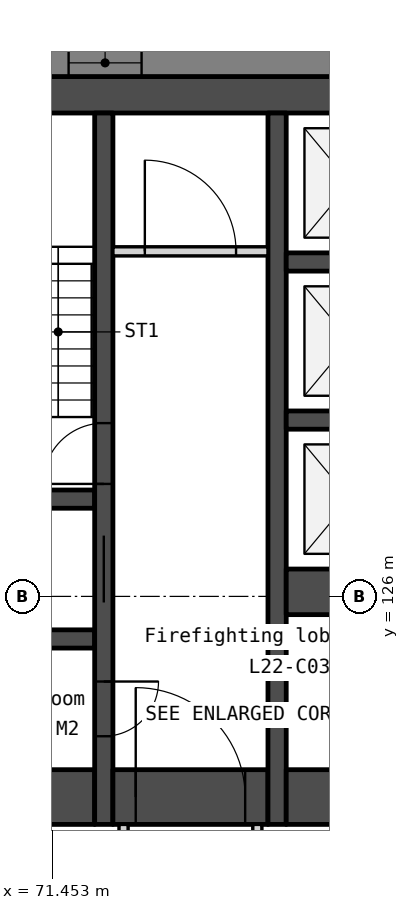
"""IFC4 building model, lengths in metres.
Left out: names, types, materials, properties, quantities, classifications, styles, units other than length and angle.
Written with IfcOpenShell. Run it as: python <this file> out.ifc"""

import sys

from ifc_helpers import new_model, si_unit, direction, frame, frame_2d, origin, place, context, subcontext, project, spatial, polyline, rectangle, outline, extrude, element, fill, save


model = new_model("IFC4")
c1 = context("Model", 3, precision=1e-05, world=origin(), true_north=direction((0.0, 1.0)))
c2 = subcontext(c1, "Body", "Model", "MODEL_VIEW")
j1 = project(units=[si_unit("LENGTHUNIT", "METRE"), si_unit("PLANEANGLEUNIT", "RADIAN")], contexts=[c1])
p1 = place(None, origin())
s1 = spatial("IfcSite", under=j1, at=p1, CompositionType="ELEMENT")
p2 = place(p1, origin())
s2 = spatial("IfcBuilding", under=s1, at=p2, CompositionType="ELEMENT")
p3 = place(p2, frame((0.0, 0.0, 92.3)))
s3 = spatial("IfcBuildingStorey", under=s2, at=p3, CompositionType="ELEMENT", Elevation=92.3)
p4 = place(p3, frame((66.0, 134.25, 0.0), z_axis=(0.0, 0.0, 1.0), x_axis=(1.0, 0.0, 0.0)))
e1 = element("IfcWall", 1, at=p4, inside=s3, PredefinedType="SOLIDWALL", context=c2, shape_type="SweptSolid", body=[
    extrude(rectangle(XDim=28.0, YDim=0.6, at=frame_2d((14.0, 0.0))), origin(), (0.0, 0.0, 1.0), 3.35),
])
for number, where, z_axis, x_axis in (
    (2, (69.6, 127.6, 0.0), (0.0, 0.0, 1.0), (1.0, 0.0, 0.0)),
    (3, (69.6, 125.3, 0.0), (0.0, 0.0, 1.0), (1.0, 0.0, 0.0)),
):
    element("IfcWall", number, at=place(p3, frame(where, z_axis=z_axis, x_axis=x_axis)), inside=s3, PredefinedType="SOLIDWALL", context=c2, shape_type="SweptSolid", body=[
        extrude(rectangle(XDim=2.55, YDim=0.3, at=frame_2d((1.275, 0.0))), origin(), (0.0, 0.0, 1.0), 3.35),
    ])
p5 = place(p3, frame((69.6, 122.7, 0.0), z_axis=(0.0, 0.0, 1.0), x_axis=(1.0, 0.0, 0.0)))
e4 = element("IfcWall", 4, at=p5, inside=s3, PredefinedType="SOLIDWALL", context=c2, shape_type="SweptSolid", body=[
    extrude(rectangle(XDim=2.55, YDim=0.9, at=frame_2d((1.275, 0.0))), origin(), (0.0, 0.0, 1.0), 3.35),
])
p6 = place(p3, frame((72.3, 133.95, 0.0), z_axis=(0.0, 0.0, 1.0), x_axis=(0.0, -1.0, 0.0)))
e5 = element("IfcWall", 5, at=p6, inside=s3, PredefinedType="SOLIDWALL", context=c2, shape_type="SweptSolid", body=[
    extrude(rectangle(XDim=11.7, YDim=0.3, at=frame_2d((5.85, 0.0))), origin(), (0.0, 0.0, 1.0), 3.35),
])
p7 = place(p6, frame((6.95, 0.0, 0.0)))
e6 = element("IfcOpeningElement", 6, at=p7, cuts=e5, PredefinedType="OPENING", context=c2, shape_type="SweptSolid", body=[
    extrude(rectangle(XDim=1.1, YDim=2.1, at=frame_2d((0.55, 1.05))), frame((0.0, 0.16, 0.0), z_axis=(0.0, -1.0, 0.0), x_axis=(1.0, 0.0, 0.0)), (0.0, 0.0, 1.0), 0.32),
])
p8 = place(p6, frame((9.35, 0.0, 0.0)))
e7 = element("IfcOpeningElement", 7, at=p8, cuts=e5, PredefinedType="OPENING", context=c2, shape_type="SweptSolid", body=[
    extrude(rectangle(XDim=0.9, YDim=2.1, at=frame_2d((0.45, 1.05))), frame((0.0, 0.16, 0.0), z_axis=(0.0, -1.0, 0.0), x_axis=(1.0, 0.0, 0.0)), (0.0, 0.0, 1.0), 0.32),
])
p9 = place(p6, frame((5.1, 0.0, 0.0)))
e8 = element("IfcOpeningElement", 8, at=p9, cuts=e5, PredefinedType="OPENING", context=c2, shape_type="SweptSolid", body=[
    extrude(rectangle(XDim=1.0, YDim=2.1, at=frame_2d((0.5, 1.05))), frame((0.0, 0.16, 0.0), z_axis=(0.0, -1.0, 0.0), x_axis=(1.0, 0.0, 0.0)), (0.0, 0.0, 1.0), 0.32),
])
p10 = place(p3, frame((72.45, 131.675, 0.0), z_axis=(0.0, 0.0, 1.0), x_axis=(1.0, 0.0, 0.0)))
e9 = element("IfcWall", 9, at=p10, inside=s3, PredefinedType="PARTITIONING", context=c2, shape_type="SweptSolid", body=[
    extrude(rectangle(XDim=2.55, YDim=0.15, at=frame_2d((1.275, 0.0))), origin(), (0.0, 0.0, 1.0), 3.35),
])
p11 = place(p10, frame((0.525, 0.0, 0.0)))
e10 = element("IfcOpeningElement", 10, at=p11, cuts=e9, PredefinedType="OPENING", context=c2, shape_type="SweptSolid", body=[
    extrude(rectangle(XDim=1.5, YDim=2.1, at=frame_2d((0.75, 1.05))), frame((0.0, 0.085, 0.0), z_axis=(0.0, -1.0, 0.0), x_axis=(1.0, 0.0, 0.0)), (0.0, 0.0, 1.0), 0.17),
])
p12 = place(p3, frame((72.45, 122.7, 0.0), z_axis=(0.0, 0.0, 1.0), x_axis=(1.0, 0.0, 0.0)))
e11 = element("IfcWall", 11, at=p12, inside=s3, PredefinedType="SOLIDWALL", context=c2, shape_type="SweptSolid", body=[
    extrude(rectangle(XDim=2.55, YDim=0.9, at=frame_2d((1.275, 0.0))), origin(), (0.0, 0.0, 1.0), 3.35),
])
p13 = place(p12, frame((0.375, 0.0, 0.0)))
e12 = element("IfcOpeningElement", 12, at=p13, cuts=e11, PredefinedType="OPENING", context=c2, shape_type="SweptSolid", body=[
    extrude(rectangle(XDim=1.8, YDim=2.1, at=frame_2d((0.9, 1.05))), frame((0.0, 0.46, 0.0), z_axis=(0.0, -1.0, 0.0), x_axis=(1.0, 0.0, 0.0)), (0.0, 0.0, 1.0), 0.92),
])
for number, where, z_axis, x_axis in (
    (13, (72.625, 122.25, 0.0), (0.0, 0.0, 1.0), (0.0, -1.0, 0.0)),
    (14, (74.825, 122.25, 0.0), (0.0, 0.0, 1.0), (0.0, -1.0, 0.0)),
):
    element("IfcWall", number, at=place(p3, frame(where, z_axis=z_axis, x_axis=x_axis)), inside=s3, PredefinedType="PARTITIONING", context=c2, shape_type="SweptSolid", body=[
        extrude(rectangle(XDim=2.1, YDim=0.15, at=frame_2d((1.05, 0.0))), origin(), (0.0, 0.0, 1.0), 3.35),
    ])
p14 = place(p3, frame((75.15, 133.95, 0.0), z_axis=(0.0, 0.0, 1.0), x_axis=(0.0, -1.0, 0.0)))
e15 = element("IfcWall", 15, at=p14, inside=s3, PredefinedType="SOLIDWALL", context=c2, shape_type="SweptSolid", body=[
    extrude(rectangle(XDim=11.7, YDim=0.3, at=frame_2d((5.85, 0.0))), origin(), (0.0, 0.0, 1.0), 3.35),
])
for number, where, z_axis, x_axis in (
    (16, (75.3, 131.5, 0.0), (0.0, 0.0, 1.0), (1.0, 0.0, 0.0)),
    (17, (75.3, 128.9, 0.0), (0.0, 0.0, 1.0), (1.0, 0.0, 0.0)),
):
    element("IfcWall", number, at=place(p3, frame(where, z_axis=z_axis, x_axis=x_axis)), inside=s3, PredefinedType="SOLIDWALL", context=c2, shape_type="SweptSolid", body=[
        extrude(rectangle(XDim=2.1, YDim=0.3, at=frame_2d((1.05, 0.0))), origin(), (0.0, 0.0, 1.0), 3.35),
    ])
p15 = place(p3, frame((75.3, 126.075, 0.0), z_axis=(0.0, 0.0, 1.0), x_axis=(1.0, 0.0, 0.0)))
e18 = element("IfcWall", 18, at=p15, inside=s3, PredefinedType="SOLIDWALL", context=c2, shape_type="SweptSolid", body=[
    extrude(rectangle(XDim=2.1, YDim=0.75, at=frame_2d((1.05, 0.0))), origin(), (0.0, 0.0, 1.0), 3.35),
])
p16 = place(p3, frame((75.3, 122.7, 0.0), z_axis=(0.0, 0.0, 1.0), x_axis=(1.0, 0.0, 0.0)))
e19 = element("IfcWall", 19, at=p16, inside=s3, PredefinedType="SOLIDWALL", context=c2, shape_type="SweptSolid", body=[
    extrude(rectangle(XDim=6.2, YDim=0.9, at=frame_2d((3.1, 0.0))), origin(), (0.0, 0.0, 1.0), 3.35),
])
p17 = place(p3, frame((101.322, 134.775, -0.15), z_axis=(0.0, 0.0, 1.0), x_axis=(-1.0, 0.0, 0.0)))
e20 = element("IfcWall", 20, at=p17, inside=s3, PredefinedType="SOLIDWALL", context=c2, shape_type="SweptSolid", body=[
    extrude(outline(polyline([(0.0, 0.0), (0.0, 3.5), (36.779, 3.5), (36.779, 0.0), (0.0, 0.0)])), frame((0.0, 0.225, 0.0), z_axis=(0.0, -1.0, 0.0), x_axis=(1.0, 0.0, 0.0)), (0.0, 0.0, 1.0), 0.45),
])
p18 = place(p17, frame((2.814, 0.0, 1.05)))
e21 = element("IfcOpeningElement", 21, at=p18, cuts=e20, PredefinedType="OPENING", context=c2, shape_type="SweptSolid", body=[
    extrude(rectangle(XDim=1.2, YDim=1.5, at=frame_2d((0.6, 0.75))), frame((0.0, 0.235, 0.0), z_axis=(0.0, -1.0, 0.0), x_axis=(1.0, 0.0, 0.0)), (0.0, 0.0, 1.0), 0.47),
])
p19 = place(p17, frame((4.514, 0.0, 1.05)))
e22 = element("IfcOpeningElement", 22, at=p19, cuts=e20, PredefinedType="OPENING", context=c2, shape_type="SweptSolid", body=[
    extrude(rectangle(XDim=1.2, YDim=1.5, at=frame_2d((0.6, 0.75))), frame((0.0, 0.235, 0.0), z_axis=(0.0, -1.0, 0.0), x_axis=(1.0, 0.0, 0.0)), (0.0, 0.0, 1.0), 0.47),
])
p20 = place(p17, frame((11.343, 0.0, 1.05)))
e23 = element("IfcOpeningElement", 23, at=p20, cuts=e20, PredefinedType="OPENING", context=c2, shape_type="SweptSolid", body=[
    extrude(rectangle(XDim=1.2, YDim=1.5, at=frame_2d((0.6, 0.75))), frame((0.0, 0.235, 0.0), z_axis=(0.0, -1.0, 0.0), x_axis=(1.0, 0.0, 0.0)), (0.0, 0.0, 1.0), 0.47),
])
p21 = place(p17, frame((13.043, 0.0, 1.05)))
e24 = element("IfcOpeningElement", 24, at=p21, cuts=e20, PredefinedType="OPENING", context=c2, shape_type="SweptSolid", body=[
    extrude(rectangle(XDim=1.2, YDim=1.5, at=frame_2d((0.6, 0.75))), frame((0.0, 0.235, 0.0), z_axis=(0.0, -1.0, 0.0), x_axis=(1.0, 0.0, 0.0)), (0.0, 0.0, 1.0), 0.47),
])
p22 = place(p17, frame((19.872, 0.0, 1.05)))
e25 = element("IfcOpeningElement", 25, at=p22, cuts=e20, PredefinedType="OPENING", context=c2, shape_type="SweptSolid", body=[
    extrude(rectangle(XDim=1.2, YDim=1.5, at=frame_2d((0.6, 0.75))), frame((0.0, 0.235, 0.0), z_axis=(0.0, -1.0, 0.0), x_axis=(1.0, 0.0, 0.0)), (0.0, 0.0, 1.0), 0.47),
])
p23 = place(p17, frame((21.572, 0.0, 1.05)))
e26 = element("IfcOpeningElement", 26, at=p23, cuts=e20, PredefinedType="OPENING", context=c2, shape_type="SweptSolid", body=[
    extrude(rectangle(XDim=1.2, YDim=1.5, at=frame_2d((0.6, 0.75))), frame((0.0, 0.235, 0.0), z_axis=(0.0, -1.0, 0.0), x_axis=(1.0, 0.0, 0.0)), (0.0, 0.0, 1.0), 0.47),
])
p24 = place(p17, frame((28.4, 0.0, 1.05)))
e27 = element("IfcOpeningElement", 27, at=p24, cuts=e20, PredefinedType="OPENING", context=c2, shape_type="SweptSolid", body=[
    extrude(rectangle(XDim=1.2, YDim=1.5, at=frame_2d((0.6, 0.75))), frame((0.0, 0.235, 0.0), z_axis=(0.0, -1.0, 0.0), x_axis=(1.0, 0.0, 0.0)), (0.0, 0.0, 1.0), 0.47),
])
p25 = place(p17, frame((30.1, 0.0, 1.05)))
e28 = element("IfcOpeningElement", 28, at=p25, cuts=e20, PredefinedType="OPENING", context=c2, shape_type="SweptSolid", body=[
    extrude(rectangle(XDim=1.2, YDim=1.5, at=frame_2d((0.6, 0.75))), frame((0.0, 0.235, 0.0), z_axis=(0.0, -1.0, 0.0), x_axis=(1.0, 0.0, 0.0)), (0.0, 0.0, 1.0), 0.47),
])
p26 = place(p3, frame((56.073, 130.263, -0.15), z_axis=(0.0, 0.0, 1.0), x_axis=(0.500000478905, -0.866025127289, 0.0)))
e29 = element("IfcWall", 29, at=p26, inside=s3, PredefinedType="SOLIDWALL", context=c2, shape_type="SweptSolid", body=[
    extrude(outline(polyline([(42.643, 0.0), (42.643, 3.5), (0.0, 3.5), (0.0, 0.0), (42.643, 0.0)])), frame((0.0, 0.225, 0.0), z_axis=(0.0, -1.0, 0.0), x_axis=(1.0, 0.0, 0.0)), (0.0, 0.0, 1.0), 0.45),
])
p27 = place(p26, frame((2.814, 0.0, 1.05)))
e30 = element("IfcOpeningElement", 30, at=p27, cuts=e29, PredefinedType="OPENING", context=c2, shape_type="SweptSolid", body=[
    extrude(rectangle(XDim=1.2, YDim=1.5, at=frame_2d((0.6, 0.75))), frame((0.0, 0.235, 0.0), z_axis=(0.0, -1.0, 0.0), x_axis=(1.0, 0.0, 0.0)), (0.0, 0.0, 1.0), 0.47),
])
p28 = place(p26, frame((4.514, 0.0, 1.05)))
e31 = element("IfcOpeningElement", 31, at=p28, cuts=e29, PredefinedType="OPENING", context=c2, shape_type="SweptSolid", body=[
    extrude(rectangle(XDim=1.2, YDim=1.5, at=frame_2d((0.6, 0.75))), frame((0.0, 0.235, 0.0), z_axis=(0.0, -1.0, 0.0), x_axis=(1.0, 0.0, 0.0)), (0.0, 0.0, 1.0), 0.47),
])
p29 = place(p26, frame((11.343, 0.0, 1.05)))
e32 = element("IfcOpeningElement", 32, at=p29, cuts=e29, PredefinedType="OPENING", context=c2, shape_type="SweptSolid", body=[
    extrude(rectangle(XDim=1.2, YDim=1.5, at=frame_2d((0.6, 0.75))), frame((0.0, 0.235, 0.0), z_axis=(0.0, -1.0, 0.0), x_axis=(1.0, 0.0, 0.0)), (0.0, 0.0, 1.0), 0.47),
])
p30 = place(p26, frame((13.043, 0.0, 1.05)))
e33 = element("IfcOpeningElement", 33, at=p30, cuts=e29, PredefinedType="OPENING", context=c2, shape_type="SweptSolid", body=[
    extrude(rectangle(XDim=1.2, YDim=1.5, at=frame_2d((0.6, 0.75))), frame((0.0, 0.235, 0.0), z_axis=(0.0, -1.0, 0.0), x_axis=(1.0, 0.0, 0.0)), (0.0, 0.0, 1.0), 0.47),
])
p31 = place(p26, frame((19.872, 0.0, 1.05)))
e34 = element("IfcOpeningElement", 34, at=p31, cuts=e29, PredefinedType="OPENING", context=c2, shape_type="SweptSolid", body=[
    extrude(rectangle(XDim=1.2, YDim=1.5, at=frame_2d((0.6, 0.75))), frame((0.0, 0.235, 0.0), z_axis=(0.0, -1.0, 0.0), x_axis=(1.0, 0.0, 0.0)), (0.0, 0.0, 1.0), 0.47),
])
p32 = place(p26, frame((21.572, 0.0, 1.05)))
e35 = element("IfcOpeningElement", 35, at=p32, cuts=e29, PredefinedType="OPENING", context=c2, shape_type="SweptSolid", body=[
    extrude(rectangle(XDim=1.2, YDim=1.5, at=frame_2d((0.6, 0.75))), frame((0.0, 0.235, 0.0), z_axis=(0.0, -1.0, 0.0), x_axis=(1.0, 0.0, 0.0)), (0.0, 0.0, 1.0), 0.47),
])
p33 = place(p26, frame((28.4, 0.0, 1.05)))
e36 = element("IfcOpeningElement", 36, at=p33, cuts=e29, PredefinedType="OPENING", context=c2, shape_type="SweptSolid", body=[
    extrude(rectangle(XDim=1.2, YDim=1.5, at=frame_2d((0.6, 0.75))), frame((0.0, 0.235, 0.0), z_axis=(0.0, -1.0, 0.0), x_axis=(1.0, 0.0, 0.0)), (0.0, 0.0, 1.0), 0.47),
])
p34 = place(p26, frame((30.1, 0.0, 1.05)))
e37 = element("IfcOpeningElement", 37, at=p34, cuts=e29, PredefinedType="OPENING", context=c2, shape_type="SweptSolid", body=[
    extrude(rectangle(XDim=1.2, YDim=1.5, at=frame_2d((0.6, 0.75))), frame((0.0, 0.235, 0.0), z_axis=(0.0, -1.0, 0.0), x_axis=(1.0, 0.0, 0.0)), (0.0, 0.0, 1.0), 0.47),
])
p35 = place(p26, frame((36.929, 0.0, 1.05)))
e38 = element("IfcOpeningElement", 38, at=p35, cuts=e29, PredefinedType="OPENING", context=c2, shape_type="SweptSolid", body=[
    extrude(rectangle(XDim=1.2, YDim=1.5, at=frame_2d((0.6, 0.75))), frame((0.0, 0.235, 0.0), z_axis=(0.0, -1.0, 0.0), x_axis=(1.0, 0.0, 0.0)), (0.0, 0.0, 1.0), 0.47),
])
p36 = place(p26, frame((38.629, 0.0, 1.05)))
e39 = element("IfcOpeningElement", 39, at=p36, cuts=e29, PredefinedType="OPENING", context=c2, shape_type="SweptSolid", body=[
    extrude(rectangle(XDim=1.2, YDim=1.5, at=frame_2d((0.6, 0.75))), frame((0.0, 0.235, 0.0), z_axis=(0.0, -1.0, 0.0), x_axis=(1.0, 0.0, 0.0)), (0.0, 0.0, 1.0), 0.47),
])
p37 = place(p7, origin())
e40 = element("IfcDoor", 40, at=p37, inside=s3, OperationType="SLIDING_TO_LEFT", PredefinedType="DOOR", context=c2, shape_type="SweptSolid", body=[
    extrude(rectangle(XDim=1.1, YDim=2.1, at=frame_2d((0.55, 1.05))), frame((0.0, 0.025, 0.0), z_axis=(0.0, -1.0, 0.0), x_axis=(1.0, 0.0, 0.0)), (0.0, 0.0, 1.0), 0.05),
])
fill(e6, e40)
p38 = place(p13, origin())
e41 = element("IfcDoor", 41, at=p38, inside=s3, OperationType="DOUBLE_DOOR_DOUBLE_SWING", PredefinedType="DOOR", context=c2, shape_type="SweptSolid", body=[
    extrude(rectangle(XDim=1.8, YDim=2.1, at=frame_2d((0.9, 1.05))), frame((0.0, 0.025, 0.0), z_axis=(0.0, -1.0, 0.0), x_axis=(1.0, 0.0, 0.0)), (0.0, 0.0, 1.0), 0.05),
])
fill(e12, e41)
p39 = place(p11, origin())
e42 = element("IfcDoor", 42, at=p39, inside=s3, OperationType="DOUBLE_DOOR_DOUBLE_SWING", PredefinedType="DOOR", context=c2, shape_type="SweptSolid", body=[
    extrude(rectangle(XDim=1.5, YDim=2.1, at=frame_2d((0.75, 1.05))), frame((0.0, 0.025, 0.0), z_axis=(0.0, -1.0, 0.0), x_axis=(1.0, 0.0, 0.0)), (0.0, 0.0, 1.0), 0.05),
])
fill(e10, e42)
p40 = place(p8, origin())
e43 = element("IfcDoor", 43, at=p40, inside=s3, OperationType="SINGLE_SWING_LEFT", PredefinedType="DOOR", context=c2, shape_type="SweptSolid", body=[
    extrude(rectangle(XDim=0.9, YDim=2.1, at=frame_2d((0.45, 1.05))), frame((0.0, 0.025, 0.0), z_axis=(0.0, -1.0, 0.0), x_axis=(1.0, 0.0, 0.0)), (0.0, 0.0, 1.0), 0.05),
])
fill(e7, e43)
p41 = place(p9, origin())
e44 = element("IfcDoor", 44, at=p41, inside=s3, OperationType="SINGLE_SWING_RIGHT", PredefinedType="DOOR", context=c2, shape_type="SweptSolid", body=[
    extrude(rectangle(XDim=1.0, YDim=2.1, at=frame_2d((0.5, 1.05))), frame((0.0, 0.025, 0.0), z_axis=(0.0, -1.0, 0.0), x_axis=(1.0, 0.0, 0.0)), (0.0, 0.0, 1.0), 0.05),
])
fill(e8, e44)
p42 = place(p24, origin())
e45 = element("IfcWindow", 45, at=p42, inside=s3, PartitioningType="SINGLE_PANEL", PredefinedType="WINDOW", context=c2, shape_type="SweptSolid", body=[
    extrude(rectangle(XDim=1.2, YDim=1.5, at=frame_2d((0.6, 0.75))), frame((0.0, 0.03, 0.0), z_axis=(0.0, -1.0, 0.0), x_axis=(1.0, 0.0, 0.0)), (0.0, 0.0, 1.0), 0.06),
])
fill(e27, e45)
save(model, sys.argv[1])
